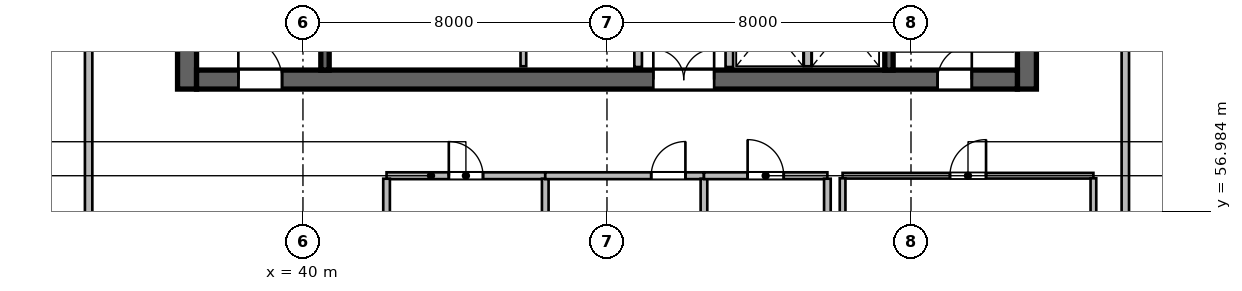
"""IFC4 building model, lengths in metres.
Left out: names, types, materials, properties, quantities, classifications, styles, units other than length and angle.
Written with IfcOpenShell. Run it as: python <this file> out.ifc"""

import sys

from ifc_helpers import new_model, si_unit, direction, frame, frame_2d, origin, place, context, subcontext, project, spatial, rectangle, extrude, source, transform, mapped, element, fill, save


model = new_model("IFC4")
c1 = context("Model", 3, precision=1e-05, world=origin(), true_north=direction((0.0, 1.0)))
c2 = subcontext(c1, "Body", "Model", "MODEL_VIEW")
j1 = project(units=[si_unit("LENGTHUNIT", "METRE"), si_unit("PLANEANGLEUNIT", "RADIAN")], contexts=[c1])
p1 = place(None, origin())
s1 = spatial("IfcSite", under=j1, at=p1, CompositionType="ELEMENT")
p2 = place(p1, origin())
s2 = spatial("IfcBuilding", under=s1, at=p2, CompositionType="ELEMENT")
p3 = place(p2, frame((0.0, 0.0, 111.6)))
s3 = spatial("IfcBuildingStorey", under=s2, at=p3, CompositionType="ELEMENT", Elevation=111.6)
m1 = source(origin(), c2, "Body", "SweptSolid", [
    extrude(rectangle(XDim=12.0, YDim=0.5, at=frame_2d((6.0, 0.0))), origin(), (0.0, 0.0, 1.0), 3.9),
])
for number, where, z_axis, x_axis in (
    (1, (36.95, 60.2, 0.0), (0.0, 0.0, 1.0), (0.0, 1.0, 0.0)),
    (2, (59.05, 60.2, 0.0), (0.0, 0.0, 1.0), (0.0, 1.0, 0.0)),
):
    element("IfcWall", number, at=place(p3, frame(where, z_axis=z_axis, x_axis=x_axis)), inside=s3, PredefinedType="SHEAR", context=c2, shape_type="MappedRepresentation", body=[
        mapped(m1, transform((0.0, 0.0, 0.0), scale=1.0)),
    ])
m2 = source(origin(), c2, "Body", "SweptSolid", [
    extrude(rectangle(XDim=21.6, YDim=0.5, at=frame_2d((10.8, 0.0))), origin(), (0.0, 0.0, 1.0), 3.9),
])
p4 = place(p3, frame((37.2, 60.45, 0.0), z_axis=(0.0, 0.0, 1.0), x_axis=(1.0, 0.0, 0.0)))
e3 = element("IfcWall", 3, at=p4, inside=s3, PredefinedType="SHEAR", context=c2, shape_type="MappedRepresentation", body=[
    mapped(m2, transform((0.0, 0.0, 0.0), scale=1.0)),
])
p5 = place(p4, frame((1.1, 0.0, 0.0)))
e4 = element("IfcOpeningElement", 4, at=p5, cuts=e3, PredefinedType="OPENING", context=c2, shape_type="SweptSolid", body=[
    extrude(rectangle(XDim=1.15, YDim=2.15, at=frame_2d((0.575, 1.075))), frame((0.0, 0.26, 0.0), z_axis=(0.0, -1.0, 0.0), x_axis=(1.0, 0.0, 0.0)), (0.0, 0.0, 1.0), 0.52),
])
p6 = place(p4, frame((19.5, 0.0, 0.0)))
e5 = element("IfcOpeningElement", 5, at=p6, cuts=e3, PredefinedType="OPENING", context=c2, shape_type="SweptSolid", body=[
    extrude(rectangle(XDim=0.9, YDim=2.1, at=frame_2d((0.45, 1.05))), frame((0.0, 0.26, 0.0), z_axis=(0.0, -1.0, 0.0), x_axis=(1.0, 0.0, 0.0)), (0.0, 0.0, 1.0), 0.52),
])
p7 = place(p4, frame((12.02, 0.0, 0.0)))
e6 = element("IfcOpeningElement", 6, at=p7, cuts=e3, PredefinedType="OPENING", context=c2, shape_type="SweptSolid", body=[
    extrude(rectangle(XDim=1.6, YDim=2.15, at=frame_2d((0.8, 1.075))), frame((0.0, 0.26, 0.0), z_axis=(0.0, -1.0, 0.0), x_axis=(1.0, 0.0, 0.0)), (0.0, 0.0, 1.0), 0.52),
])
m3 = source(origin(), c2, "Body", "SweptSolid", [
    extrude(rectangle(XDim=11.0, YDim=0.22, at=frame_2d((5.5, 0.0))), origin(), (0.0, 0.0, 1.0), 3.9),
])
p8 = place(p3, frame((40.58, 60.7, 0.0), z_axis=(0.0, 0.0, 1.0), x_axis=(0.0, 1.0, 0.0)))
e7 = element("IfcWall", 7, at=p8, inside=s3, PredefinedType="SHEAR", context=c2, shape_type="MappedRepresentation", body=[
    mapped(m3, transform((0.0, 0.0, 0.0), scale=1.0)),
])
p9 = place(p3, frame((55.42, 60.7, 0.0), z_axis=(0.0, 0.0, 1.0), x_axis=(0.0, 1.0, 0.0)))
e8 = element("IfcWall", 8, at=p9, inside=s3, PredefinedType="SHEAR", context=c2, shape_type="MappedRepresentation", body=[
    mapped(m3, transform((0.0, 0.0, 0.0), scale=1.0)),
])
p10 = place(p9, frame((9.545, 0.0, 0.0)))
e9 = element("IfcOpeningElement", 9, at=p10, cuts=e8, PredefinedType="OPENING", context=c2, shape_type="SweptSolid", body=[
    extrude(rectangle(XDim=1.15, YDim=2.15, at=frame_2d((0.575, 1.075))), frame((0.0, 0.12, 0.0), z_axis=(0.0, -1.0, 0.0), x_axis=(1.0, 0.0, 0.0)), (0.0, 0.0, 1.0), 0.24),
])
m4 = source(origin(), c2, "Body", "SweptSolid", [
    extrude(rectangle(XDim=2.24, YDim=0.2, at=frame_2d((1.12, 0.0))), origin(), (0.0, 0.0, 1.0), 3.65),
])
for number, where, z_axis, x_axis in (
    (10, (48.82, 60.78, 0.0), (0.0, 0.0, 1.0), (0.0, 1.0, 0.0)),
    (11, (51.22, 60.78, 0.0), (0.0, 0.0, 1.0), (0.0, 1.0, 0.0)),
):
    element("IfcWall", number, at=place(p3, frame(where, z_axis=z_axis, x_axis=x_axis)), inside=s3, PredefinedType="SOLIDWALL", context=c2, shape_type="MappedRepresentation", body=[
        mapped(m4, transform((0.0, 0.0, 0.0), scale=1.0)),
    ])
m5 = source(origin(), c2, "Body", "SweptSolid", [
    extrude(rectangle(XDim=2.2, YDim=0.15, at=frame_2d((1.1, 0.0))), origin(), (0.0, 0.0, 1.0), 3.65),
])
p11 = place(p3, frame((45.8, 60.8, 0.0), z_axis=(0.0, 0.0, 1.0), x_axis=(0.0, 1.0, 0.0)))
e12 = element("IfcWall", 12, at=p11, inside=s3, PredefinedType="PARTITIONING", context=c2, shape_type="MappedRepresentation", body=[
    mapped(m5, transform((0.0, 0.0, 0.0), scale=1.0)),
])
m6 = source(origin(), c2, "Body", "SweptSolid", [
    extrude(rectangle(XDim=2.2, YDim=0.2, at=frame_2d((1.1, 0.0))), origin(), (0.0, 0.0, 1.0), 3.65),
])
p12 = place(p3, frame((53.28, 60.8, 0.0), z_axis=(0.0, 0.0, 1.0), x_axis=(0.0, 1.0, 0.0)))
e13 = element("IfcWall", 13, at=p12, inside=s3, PredefinedType="SOLIDWALL", context=c2, shape_type="MappedRepresentation", body=[
    mapped(m6, transform((0.0, 0.0, 0.0), scale=1.0)),
])
m7 = source(origin(), c2, "Body", "SweptSolid", [
    extrude(rectangle(XDim=4.176, YDim=0.18, at=frame_2d((2.088, 0.0))), origin(), (0.0, 0.0, 1.0), 3.65),
])
p13 = place(p3, frame((42.2, 57.92, 0.0), z_axis=(0.0, 0.0, 1.0), x_axis=(1.0, 0.0, 0.0)))
e14 = element("IfcWall", 14, at=p13, inside=s3, PredefinedType="PLUMBINGWALL", context=c2, shape_type="MappedRepresentation", body=[
    mapped(m7, transform((0.0, 0.0, 0.0), scale=1.0)),
])
p14 = place(p13, frame((1.638, 0.0, 0.0)))
e15 = element("IfcOpeningElement", 15, at=p14, cuts=e14, PredefinedType="OPENING", context=c2, shape_type="SweptSolid", body=[
    extrude(rectangle(XDim=0.9, YDim=2.08, at=frame_2d((0.45, 1.04))), frame((0.0, 0.1, 0.0), z_axis=(0.0, -1.0, 0.0), x_axis=(1.0, 0.0, 0.0)), (0.0, 0.0, 1.0), 0.2),
])
m8 = source(origin(), c2, "Body", "SweptSolid", [
    extrude(rectangle(XDim=3.763, YDim=0.175, at=frame_2d((1.881, 0.0))), origin(), (0.0, 0.0, 1.0), 3.65),
])
for number, where, z_axis, x_axis in (
    (16, (42.2, 54.079, 0.0), (0.0, 0.0, 1.0), (0.0, 1.0, 0.0)),
    (17, (46.376, 54.079, 0.0), (0.0, 0.0, 1.0), (0.0, 1.0, 0.0)),
):
    element("IfcWall", number, at=place(p3, frame(where, z_axis=z_axis, x_axis=x_axis)), inside=s3, PredefinedType="PARTITIONING", context=c2, shape_type="MappedRepresentation", body=[
        mapped(m8, transform((0.0, 0.0, 0.0), scale=1.0)),
    ])
p15 = place(p3, frame((46.376, 57.92, 0.0), z_axis=(0.0, 0.0, 1.0), x_axis=(1.0, 0.0, 0.0)))
e18 = element("IfcWall", 18, at=p15, inside=s3, PredefinedType="PLUMBINGWALL", context=c2, shape_type="MappedRepresentation", body=[
    mapped(m7, transform((0.0, 0.0, 0.0), scale=1.0)),
])
p16 = place(p15, frame((2.788, 0.0, 0.0)))
e19 = element("IfcOpeningElement", 19, at=p16, cuts=e18, PredefinedType="OPENING", context=c2, shape_type="SweptSolid", body=[
    extrude(rectangle(XDim=0.9, YDim=2.08, at=frame_2d((0.45, 1.04))), frame((0.0, 0.1, 0.0), z_axis=(0.0, -1.0, 0.0), x_axis=(1.0, 0.0, 0.0)), (0.0, 0.0, 1.0), 0.2),
])
p17 = place(p3, frame((50.552, 54.079, 0.0), z_axis=(0.0, 0.0, 1.0), x_axis=(0.0, 1.0, 0.0)))
e20 = element("IfcWall", 20, at=p17, inside=s3, PredefinedType="PARTITIONING", context=c2, shape_type="MappedRepresentation", body=[
    mapped(m8, transform((0.0, 0.0, 0.0), scale=1.0)),
])
m9 = source(origin(), c2, "Body", "SweptSolid", [
    extrude(rectangle(XDim=3.248, YDim=0.18, at=frame_2d((1.624, 0.0))), origin(), (0.0, 0.0, 1.0), 3.65),
])
p18 = place(p3, frame((50.552, 57.92, 0.0), z_axis=(0.0, 0.0, 1.0), x_axis=(1.0, 0.0, 0.0)))
e21 = element("IfcWall", 21, at=p18, inside=s3, PredefinedType="PLUMBINGWALL", context=c2, shape_type="MappedRepresentation", body=[
    mapped(m9, transform((0.0, 0.0, 0.0), scale=1.0)),
])
p19 = place(p18, frame((1.149, 0.0, 0.0)))
e22 = element("IfcOpeningElement", 22, at=p19, cuts=e21, PredefinedType="OPENING", context=c2, shape_type="SweptSolid", body=[
    extrude(rectangle(XDim=0.95, YDim=2.12, at=frame_2d((0.475, 1.06))), frame((0.0, 0.1, 0.0), z_axis=(0.0, -1.0, 0.0), x_axis=(1.0, 0.0, 0.0)), (0.0, 0.0, 1.0), 0.2),
])
p20 = place(p3, frame((53.8, 54.079, 0.0), z_axis=(0.0, 0.0, 1.0), x_axis=(0.0, 1.0, 0.0)))
e23 = element("IfcWall", 23, at=p20, inside=s3, PredefinedType="PARTITIONING", context=c2, shape_type="MappedRepresentation", body=[
    mapped(m8, transform((0.0, 0.0, 0.0), scale=1.0)),
])
m10 = source(origin(), c2, "Body", "SweptSolid", [
    extrude(rectangle(XDim=6.6, YDim=0.15, at=frame_2d((3.3, 0.0))), origin(), (0.0, 0.0, 1.0), 3.65),
])
p21 = place(p3, frame((54.2, 57.92, 0.0), z_axis=(0.0, 0.0, 1.0), x_axis=(1.0, 0.0, 0.0)))
e24 = element("IfcWall", 24, at=p21, inside=s3, PredefinedType="PARTITIONING", context=c2, shape_type="MappedRepresentation", body=[
    mapped(m10, transform((0.0, 0.0, 0.0), scale=1.0)),
])
p22 = place(p21, frame((2.825, 0.0, 0.0)))
e25 = element("IfcOpeningElement", 25, at=p22, cuts=e24, PredefinedType="OPENING", context=c2, shape_type="SweptSolid", body=[
    extrude(rectangle(XDim=0.95, YDim=2.1, at=frame_2d((0.475, 1.05))), frame((0.0, 0.085, 0.0), z_axis=(0.0, -1.0, 0.0), x_axis=(1.0, 0.0, 0.0)), (0.0, 0.0, 1.0), 0.17),
])
m11 = source(origin(), c2, "Body", "SweptSolid", [
    extrude(rectangle(XDim=3.785, YDim=0.15, at=frame_2d((1.893, 0.0))), origin(), (0.0, 0.0, 1.0), 3.65),
])
for number, where, z_axis, x_axis in (
    (26, (54.2, 54.067, 0.0), (0.0, 0.0, 1.0), (0.0, 1.0, 0.0)),
    (27, (60.8, 54.067, 0.0), (0.0, 0.0, 1.0), (0.0, 1.0, 0.0)),
):
    element("IfcWall", number, at=place(p3, frame(where, z_axis=z_axis, x_axis=x_axis)), inside=s3, PredefinedType="PARTITIONING", context=c2, shape_type="MappedRepresentation", body=[
        mapped(m11, transform((0.0, 0.0, 0.0), scale=1.0)),
    ])
m12 = source(origin(), c2, "Body", "SweptSolid", [
    extrude(rectangle(XDim=13.988, YDim=0.195, at=frame_2d((6.994, 0.0))), origin(), (0.0, 0.0, 1.0), 3.65),
])
p23 = place(p3, frame((34.36, 47.472, 0.0), z_axis=(0.0, 0.0, 1.0), x_axis=(0.0, 1.0, 0.0)))
e28 = element("IfcWall", 28, at=p23, inside=s3, PredefinedType="PARTITIONING", context=c2, shape_type="MappedRepresentation", body=[
    mapped(m12, transform((0.0, 0.0, 0.0), scale=1.0)),
])
m13 = source(origin(), c2, "Body", "SweptSolid", [
    extrude(rectangle(XDim=13.988, YDim=0.195, at=frame_2d((6.994, 0.0))), origin(), (0.0, 0.0, 1.0), 2.942),
])
p24 = place(p3, frame((61.64, 47.472, 0.0), z_axis=(0.0, 0.0, 1.0), x_axis=(0.0, 1.0, 0.0)))
e29 = element("IfcWall", 29, at=p24, inside=s3, PredefinedType="PARTITIONING", context=c2, shape_type="MappedRepresentation", body=[
    mapped(m13, transform((0.0, 0.0, 0.0), scale=1.0)),
])
m14 = source(origin(), c2, "Body", "SweptSolid", [
    extrude(rectangle(XDim=1.15, YDim=2.15, at=frame_2d((0.575, 1.075))), frame((0.0, 0.025, 0.0), z_axis=(0.0, -1.0, 0.0), x_axis=(1.0, 0.0, 0.0)), (0.0, 0.0, 1.0), 0.05),
])
p25 = place(p5, origin())
e30 = element("IfcDoor", 30, at=p25, inside=s3, OperationType="SINGLE_SWING_LEFT", PredefinedType="DOOR", context=c2, shape_type="MappedRepresentation", body=[
    mapped(m14, transform((0.0, 0.0, 0.0), scale=1.0)),
])
fill(e4, e30)
m15 = source(origin(), c2, "Body", "SweptSolid", [
    extrude(rectangle(XDim=0.9, YDim=2.1, at=frame_2d((0.45, 1.05))), frame((0.0, 0.025, 0.0), z_axis=(0.0, -1.0, 0.0), x_axis=(1.0, 0.0, 0.0)), (0.0, 0.0, 1.0), 0.05),
])
p26 = place(p6, origin())
e31 = element("IfcDoor", 31, at=p26, inside=s3, OperationType="SINGLE_SWING_RIGHT", PredefinedType="DOOR", context=c2, shape_type="MappedRepresentation", body=[
    mapped(m15, transform((0.0, 0.0, 0.0), scale=1.0)),
])
fill(e5, e31)
m16 = source(origin(), c2, "Body", "SweptSolid", [
    extrude(rectangle(XDim=1.6, YDim=2.15, at=frame_2d((0.8, 1.075))), frame((0.0, 0.025, 0.0), z_axis=(0.0, -1.0, 0.0), x_axis=(1.0, 0.0, 0.0)), (0.0, 0.0, 1.0), 0.05),
])
p27 = place(p7, origin())
e32 = element("IfcDoor", 32, at=p27, inside=s3, OperationType="DOUBLE_DOOR_SINGLE_SWING", PredefinedType="DOOR", context=c2, shape_type="MappedRepresentation", body=[
    mapped(m16, transform((0.0, 0.0, 0.0), scale=1.0)),
])
fill(e6, e32)
m17 = source(origin(), c2, "Body", "SweptSolid", [
    extrude(rectangle(XDim=0.9, YDim=2.08, at=frame_2d((0.45, 1.04))), frame((0.0, 0.025, 0.0), z_axis=(0.0, -1.0, 0.0), x_axis=(1.0, 0.0, 0.0)), (0.0, 0.0, 1.0), 0.05),
])
p28 = place(p14, origin())
e33 = element("IfcDoor", 33, at=p28, inside=s3, OperationType="SINGLE_SWING_LEFT", PredefinedType="DOOR", context=c2, shape_type="MappedRepresentation", body=[
    mapped(m17, transform((0.0, 0.0, 0.0), scale=1.0)),
])
fill(e15, e33)
p29 = place(p16, origin())
e34 = element("IfcDoor", 34, at=p29, inside=s3, OperationType="SINGLE_SWING_RIGHT", PredefinedType="DOOR", context=c2, shape_type="MappedRepresentation", body=[
    mapped(m17, transform((0.0, 0.0, 0.0), scale=1.0)),
])
fill(e19, e34)
m18 = source(origin(), c2, "Body", "SweptSolid", [
    extrude(rectangle(XDim=0.95, YDim=2.12, at=frame_2d((0.475, 1.06))), frame((0.0, 0.025, 0.0), z_axis=(0.0, -1.0, 0.0), x_axis=(1.0, 0.0, 0.0)), (0.0, 0.0, 1.0), 0.05),
])
p30 = place(p19, origin())
e35 = element("IfcDoor", 35, at=p30, inside=s3, OperationType="SINGLE_SWING_LEFT", PredefinedType="DOOR", context=c2, shape_type="MappedRepresentation", body=[
    mapped(m18, transform((0.0, 0.0, 0.0), scale=1.0)),
])
fill(e22, e35)
m19 = source(origin(), c2, "Body", "SweptSolid", [
    extrude(rectangle(XDim=0.95, YDim=2.1, at=frame_2d((0.475, 1.05))), frame((0.0, 0.025, 0.0), z_axis=(0.0, -1.0, 0.0), x_axis=(1.0, 0.0, 0.0)), (0.0, 0.0, 1.0), 0.05),
])
p31 = place(p22, origin())
e36 = element("IfcDoor", 36, at=p31, inside=s3, OperationType="SINGLE_SWING_RIGHT", PredefinedType="DOOR", context=c2, shape_type="MappedRepresentation", body=[
    mapped(m19, transform((0.0, 0.0, 0.0), scale=1.0)),
])
fill(e25, e36)
save(model, sys.argv[1])
